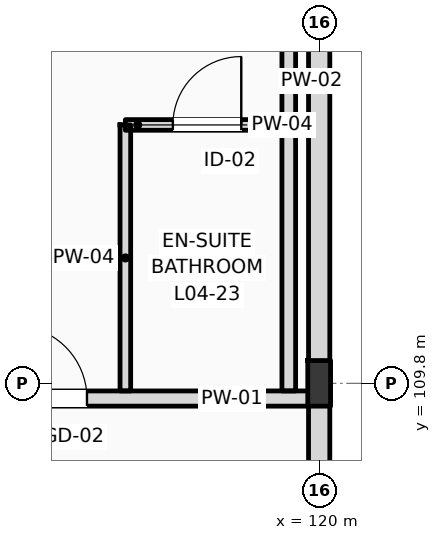
"""IFC4 building model, lengths in metres.
Left out: names, types, materials, properties, quantities, classifications, styles, units other than length and angle.
Written with IfcOpenShell. Run it as: python <this file> out.ifc"""

import sys

from ifc_helpers import new_model, si_unit, direction, frame, frame_2d, origin, origin_2d, place, context, subcontext, project, spatial, rectangle, i_section, extrude, element, fill, save


model = new_model("IFC4")
c1 = context("Model", 3, precision=1e-05, world=origin(), true_north=direction((0.0, 1.0)))
c2 = subcontext(c1, "Body", "Model", "MODEL_VIEW")
j1 = project(units=[si_unit("LENGTHUNIT", "METRE"), si_unit("PLANEANGLEUNIT", "RADIAN")], contexts=[c1])
p1 = place(None, origin())
s1 = spatial("IfcSite", under=j1, at=p1, CompositionType="ELEMENT")
p2 = place(p1, origin())
s2 = spatial("IfcBuilding", under=s1, at=p2, CompositionType="ELEMENT")
p3 = place(p2, frame((0.0, 0.0, 20.4)))
s3 = spatial("IfcBuildingStorey", under=s2, at=p3, CompositionType="ELEMENT", Elevation=20.4)
p4 = place(p3, frame((120.0, 109.8, 0.0), z_axis=(0.0, 0.0, 1.0), x_axis=(1.0, 0.0, 0.0)))
e1 = element("IfcColumn", 1, at=p4, inside=s3, PredefinedType="COLUMN", context=c2, shape_type="SweptSolid", body=[
    extrude(i_section(OverallWidth=0.3, OverallDepth=0.6, WebThickness=0.015, FlangeThickness=0.03, FilletRadius=0.027, at=origin_2d()), origin(), (0.0, 0.0, 1.0), 4.2),
])
p5 = place(p3, frame((120.0, 96.0, 0.0), z_axis=(0.0, 0.0, 1.0), x_axis=(0.0, 1.0, 0.0)))
e2 = element("IfcWall", 2, at=p5, inside=s3, PredefinedType="STANDARD", context=c2, shape_type="SweptSolid", body=[
    extrude(rectangle(XDim=22.0, YDim=0.28, at=frame_2d((11.0, 0.0))), origin(), (0.0, 0.0, 1.0), 3.53),
])
p6 = place(p3, frame((10.65, 109.6, 0.0), z_axis=(0.0, 0.0, 1.0), x_axis=(1.0, 0.0, 0.0)))
e3 = element("IfcWall", 3, at=p6, inside=s3, PredefinedType="PARTITIONING", context=c2, shape_type="SweptSolid", body=[
    extrude(rectangle(XDim=109.21, YDim=0.2, at=frame_2d((54.605, 0.0))), origin(), (0.0, 0.0, 1.0), 3.38),
])
p7 = place(p6, frame((12.535, 0.0, 0.0)))
e4 = element("IfcOpeningElement", 4, at=p7, cuts=e3, PredefinedType="OPENING", context=c2, shape_type="SweptSolid", body=[
    extrude(rectangle(XDim=1.02, YDim=2.2, at=frame_2d((0.51, 1.1))), frame((0.0, 0.11, 0.0), z_axis=(0.0, -1.0, 0.0), x_axis=(1.0, 0.0, 0.0)), (0.0, 0.0, 1.0), 0.22),
])
p8 = place(p6, frame((19.175, 0.0, 0.0)))
e5 = element("IfcOpeningElement", 5, at=p8, cuts=e3, PredefinedType="OPENING", context=c2, shape_type="SweptSolid", body=[
    extrude(rectangle(XDim=1.02, YDim=2.2, at=frame_2d((0.51, 1.1))), frame((0.0, 0.11, 0.0), z_axis=(0.0, -1.0, 0.0), x_axis=(1.0, 0.0, 0.0)), (0.0, 0.0, 1.0), 0.22),
])
p9 = place(p6, frame((23.375, 0.0, 0.0)))
e6 = element("IfcOpeningElement", 6, at=p9, cuts=e3, PredefinedType="OPENING", context=c2, shape_type="SweptSolid", body=[
    extrude(rectangle(XDim=1.02, YDim=2.2, at=frame_2d((0.51, 1.1))), frame((0.0, 0.11, 0.0), z_axis=(0.0, -1.0, 0.0), x_axis=(1.0, 0.0, 0.0)), (0.0, 0.0, 1.0), 0.22),
])
p10 = place(p6, frame((27.575, 0.0, 0.0)))
e7 = element("IfcOpeningElement", 7, at=p10, cuts=e3, PredefinedType="OPENING", context=c2, shape_type="SweptSolid", body=[
    extrude(rectangle(XDim=1.02, YDim=2.2, at=frame_2d((0.51, 1.1))), frame((0.0, 0.11, 0.0), z_axis=(0.0, -1.0, 0.0), x_axis=(1.0, 0.0, 0.0)), (0.0, 0.0, 1.0), 0.22),
])
p11 = place(p6, frame((31.805, 0.0, 0.0)))
e8 = element("IfcOpeningElement", 8, at=p11, cuts=e3, PredefinedType="OPENING", context=c2, shape_type="SweptSolid", body=[
    extrude(rectangle(XDim=0.96, YDim=2.2, at=frame_2d((0.48, 1.1))), frame((0.0, 0.11, 0.0), z_axis=(0.0, -1.0, 0.0), x_axis=(1.0, 0.0, 0.0)), (0.0, 0.0, 1.0), 0.22),
])
p12 = place(p6, frame((33.855, 0.0, 0.0)))
e9 = element("IfcOpeningElement", 9, at=p12, cuts=e3, PredefinedType="OPENING", context=c2, shape_type="SweptSolid", body=[
    extrude(rectangle(XDim=0.96, YDim=2.2, at=frame_2d((0.48, 1.1))), frame((0.0, 0.11, 0.0), z_axis=(0.0, -1.0, 0.0), x_axis=(1.0, 0.0, 0.0)), (0.0, 0.0, 1.0), 0.22),
])
p13 = place(p6, frame((40.205, 0.0, 0.0)))
e10 = element("IfcOpeningElement", 10, at=p13, cuts=e3, PredefinedType="OPENING", context=c2, shape_type="SweptSolid", body=[
    extrude(rectangle(XDim=0.96, YDim=2.2, at=frame_2d((0.48, 1.1))), frame((0.0, 0.11, 0.0), z_axis=(0.0, -1.0, 0.0), x_axis=(1.0, 0.0, 0.0)), (0.0, 0.0, 1.0), 0.22),
])
p14 = place(p6, frame((42.255, 0.0, 0.0)))
e11 = element("IfcOpeningElement", 11, at=p14, cuts=e3, PredefinedType="OPENING", context=c2, shape_type="SweptSolid", body=[
    extrude(rectangle(XDim=0.96, YDim=2.2, at=frame_2d((0.48, 1.1))), frame((0.0, 0.11, 0.0), z_axis=(0.0, -1.0, 0.0), x_axis=(1.0, 0.0, 0.0)), (0.0, 0.0, 1.0), 0.22),
])
p15 = place(p6, frame((48.605, 0.0, 0.0)))
e12 = element("IfcOpeningElement", 12, at=p15, cuts=e3, PredefinedType="OPENING", context=c2, shape_type="SweptSolid", body=[
    extrude(rectangle(XDim=0.96, YDim=2.2, at=frame_2d((0.48, 1.1))), frame((0.0, 0.11, 0.0), z_axis=(0.0, -1.0, 0.0), x_axis=(1.0, 0.0, 0.0)), (0.0, 0.0, 1.0), 0.22),
])
p16 = place(p6, frame((50.655, 0.0, 0.0)))
e13 = element("IfcOpeningElement", 13, at=p16, cuts=e3, PredefinedType="OPENING", context=c2, shape_type="SweptSolid", body=[
    extrude(rectangle(XDim=0.96, YDim=2.2, at=frame_2d((0.48, 1.1))), frame((0.0, 0.11, 0.0), z_axis=(0.0, -1.0, 0.0), x_axis=(1.0, 0.0, 0.0)), (0.0, 0.0, 1.0), 0.22),
])
p17 = place(p6, frame((57.005, 0.0, 0.0)))
e14 = element("IfcOpeningElement", 14, at=p17, cuts=e3, PredefinedType="OPENING", context=c2, shape_type="SweptSolid", body=[
    extrude(rectangle(XDim=0.96, YDim=2.2, at=frame_2d((0.48, 1.1))), frame((0.0, 0.11, 0.0), z_axis=(0.0, -1.0, 0.0), x_axis=(1.0, 0.0, 0.0)), (0.0, 0.0, 1.0), 0.22),
])
p18 = place(p6, frame((59.055, 0.0, 0.0)))
e15 = element("IfcOpeningElement", 15, at=p18, cuts=e3, PredefinedType="OPENING", context=c2, shape_type="SweptSolid", body=[
    extrude(rectangle(XDim=0.96, YDim=2.2, at=frame_2d((0.48, 1.1))), frame((0.0, 0.11, 0.0), z_axis=(0.0, -1.0, 0.0), x_axis=(1.0, 0.0, 0.0)), (0.0, 0.0, 1.0), 0.22),
])
p19 = place(p6, frame((65.405, 0.0, 0.0)))
e16 = element("IfcOpeningElement", 16, at=p19, cuts=e3, PredefinedType="OPENING", context=c2, shape_type="SweptSolid", body=[
    extrude(rectangle(XDim=0.96, YDim=2.2, at=frame_2d((0.48, 1.1))), frame((0.0, 0.11, 0.0), z_axis=(0.0, -1.0, 0.0), x_axis=(1.0, 0.0, 0.0)), (0.0, 0.0, 1.0), 0.22),
])
p20 = place(p6, frame((67.205, 0.0, 0.0)))
e17 = element("IfcOpeningElement", 17, at=p20, cuts=e3, PredefinedType="OPENING", context=c2, shape_type="SweptSolid", body=[
    extrude(rectangle(XDim=0.96, YDim=2.2, at=frame_2d((0.48, 1.1))), frame((0.0, 0.11, 0.0), z_axis=(0.0, -1.0, 0.0), x_axis=(1.0, 0.0, 0.0)), (0.0, 0.0, 1.0), 0.22),
])
p21 = place(p6, frame((73.805, 0.0, 0.0)))
e18 = element("IfcOpeningElement", 18, at=p21, cuts=e3, PredefinedType="OPENING", context=c2, shape_type="SweptSolid", body=[
    extrude(rectangle(XDim=0.96, YDim=2.2, at=frame_2d((0.48, 1.1))), frame((0.0, 0.11, 0.0), z_axis=(0.0, -1.0, 0.0), x_axis=(1.0, 0.0, 0.0)), (0.0, 0.0, 1.0), 0.22),
])
p22 = place(p6, frame((78.255, 0.0, 0.0)))
e19 = element("IfcOpeningElement", 19, at=p22, cuts=e3, PredefinedType="OPENING", context=c2, shape_type="SweptSolid", body=[
    extrude(rectangle(XDim=0.96, YDim=2.2, at=frame_2d((0.48, 1.1))), frame((0.0, 0.11, 0.0), z_axis=(0.0, -1.0, 0.0), x_axis=(1.0, 0.0, 0.0)), (0.0, 0.0, 1.0), 0.22),
])
p23 = place(p6, frame((82.205, 0.0, 0.0)))
e20 = element("IfcOpeningElement", 20, at=p23, cuts=e3, PredefinedType="OPENING", context=c2, shape_type="SweptSolid", body=[
    extrude(rectangle(XDim=0.96, YDim=2.2, at=frame_2d((0.48, 1.1))), frame((0.0, 0.11, 0.0), z_axis=(0.0, -1.0, 0.0), x_axis=(1.0, 0.0, 0.0)), (0.0, 0.0, 1.0), 0.22),
])
p24 = place(p6, frame((86.405, 0.0, 0.0)))
e21 = element("IfcOpeningElement", 21, at=p24, cuts=e3, PredefinedType="OPENING", context=c2, shape_type="SweptSolid", body=[
    extrude(rectangle(XDim=0.96, YDim=2.2, at=frame_2d((0.48, 1.1))), frame((0.0, 0.11, 0.0), z_axis=(0.0, -1.0, 0.0), x_axis=(1.0, 0.0, 0.0)), (0.0, 0.0, 1.0), 0.22),
])
p25 = place(p6, frame((90.605, 0.0, 0.0)))
e22 = element("IfcOpeningElement", 22, at=p25, cuts=e3, PredefinedType="OPENING", context=c2, shape_type="SweptSolid", body=[
    extrude(rectangle(XDim=0.96, YDim=2.2, at=frame_2d((0.48, 1.1))), frame((0.0, 0.11, 0.0), z_axis=(0.0, -1.0, 0.0), x_axis=(1.0, 0.0, 0.0)), (0.0, 0.0, 1.0), 0.22),
])
p26 = place(p6, frame((94.805, 0.0, 0.0)))
e23 = element("IfcOpeningElement", 23, at=p26, cuts=e3, PredefinedType="OPENING", context=c2, shape_type="SweptSolid", body=[
    extrude(rectangle(XDim=0.96, YDim=2.2, at=frame_2d((0.48, 1.1))), frame((0.0, 0.11, 0.0), z_axis=(0.0, -1.0, 0.0), x_axis=(1.0, 0.0, 0.0)), (0.0, 0.0, 1.0), 0.22),
])
p27 = place(p6, frame((99.005, 0.0, 0.0)))
e24 = element("IfcOpeningElement", 24, at=p27, cuts=e3, PredefinedType="OPENING", context=c2, shape_type="SweptSolid", body=[
    extrude(rectangle(XDim=0.96, YDim=2.2, at=frame_2d((0.48, 1.1))), frame((0.0, 0.11, 0.0), z_axis=(0.0, -1.0, 0.0), x_axis=(1.0, 0.0, 0.0)), (0.0, 0.0, 1.0), 0.22),
])
p28 = place(p6, frame((103.205, 0.0, 0.0)))
e25 = element("IfcOpeningElement", 25, at=p28, cuts=e3, PredefinedType="OPENING", context=c2, shape_type="SweptSolid", body=[
    extrude(rectangle(XDim=0.96, YDim=2.2, at=frame_2d((0.48, 1.1))), frame((0.0, 0.11, 0.0), z_axis=(0.0, -1.0, 0.0), x_axis=(1.0, 0.0, 0.0)), (0.0, 0.0, 1.0), 0.22),
])
p29 = place(p6, frame((105.335, 0.0, 0.0)))
e26 = element("IfcOpeningElement", 26, at=p29, cuts=e3, PredefinedType="OPENING", context=c2, shape_type="SweptSolid", body=[
    extrude(rectangle(XDim=0.96, YDim=2.2, at=frame_2d((0.48, 1.1))), frame((0.0, 0.11, 0.0), z_axis=(0.0, -1.0, 0.0), x_axis=(1.0, 0.0, 0.0)), (0.0, 0.0, 1.0), 0.22),
])
p30 = place(p6, frame((2.716, 0.0, 0.0)))
e27 = element("IfcOpeningElement", 27, at=p30, cuts=e3, PredefinedType="OPENING", context=c2, shape_type="SweptSolid", body=[
    extrude(rectangle(XDim=1.35, YDim=2.25, at=frame_2d((0.675, 1.125))), frame((0.0, 0.11, 0.0), z_axis=(0.0, -1.0, 0.0), x_axis=(1.0, 0.0, 0.0)), (0.0, 0.0, 1.0), 0.22),
])
p31 = place(p6, frame((6.65, 0.0, 0.0)))
e28 = element("IfcOpeningElement", 28, at=p31, cuts=e3, PredefinedType="OPENING", context=c2, shape_type="SweptSolid", body=[
    extrude(rectangle(XDim=1.35, YDim=2.25, at=frame_2d((0.675, 1.125))), frame((0.0, 0.11, 0.0), z_axis=(0.0, -1.0, 0.0), x_axis=(1.0, 0.0, 0.0)), (0.0, 0.0, 1.0), 0.22),
])
p32 = place(p6, frame((10.583, 0.0, 0.0)))
e29 = element("IfcOpeningElement", 29, at=p32, cuts=e3, PredefinedType="OPENING", context=c2, shape_type="SweptSolid", body=[
    extrude(rectangle(XDim=1.35, YDim=2.25, at=frame_2d((0.675, 1.125))), frame((0.0, 0.11, 0.0), z_axis=(0.0, -1.0, 0.0), x_axis=(1.0, 0.0, 0.0)), (0.0, 0.0, 1.0), 0.22),
])
p33 = place(p3, frame((119.6, 109.7, 0.0), z_axis=(0.0, 0.0, 1.0), x_axis=(0.0, 1.0, 0.0)))
e30 = element("IfcWall", 30, at=p33, inside=s3, PredefinedType="PARTITIONING", context=c2, shape_type="SweptSolid", body=[
    extrude(rectangle(XDim=8.15, YDim=0.18, at=frame_2d((4.075, 0.0))), origin(), (0.0, 0.0, 1.0), 3.94),
])
p34 = place(p3, frame((117.45, 109.7, 0.0), z_axis=(0.0, 0.0, 1.0), x_axis=(0.0, 1.0, 0.0)))
e31 = element("IfcWall", 31, at=p34, inside=s3, PredefinedType="PARTITIONING", context=c2, shape_type="SweptSolid", body=[
    extrude(rectangle(XDim=3.5, YDim=0.14, at=frame_2d((1.75, 0.0))), origin(), (0.0, 0.0, 1.0), 3.94),
])
p35 = place(p3, frame((117.45, 113.2, 0.0), z_axis=(0.0, 0.0, 1.0), x_axis=(1.0, 0.0, 0.0)))
e32 = element("IfcWall", 32, at=p35, inside=s3, PredefinedType="PARTITIONING", context=c2, shape_type="SweptSolid", body=[
    extrude(rectangle(XDim=2.15, YDim=0.14, at=frame_2d((1.075, 0.0))), origin(), (0.0, 0.0, 1.0), 3.94),
])
p36 = place(p35, frame((0.625, 0.0, 0.0)))
e33 = element("IfcOpeningElement", 33, at=p36, cuts=e32, PredefinedType="OPENING", context=c2, shape_type="SweptSolid", body=[
    extrude(rectangle(XDim=0.9, YDim=2.1, at=frame_2d((0.45, 1.05))), frame((0.0, 0.08, 0.0), z_axis=(0.0, -1.0, 0.0), x_axis=(1.0, 0.0, 0.0)), (0.0, 0.0, 1.0), 0.16),
])
p37 = place(p29, origin())
e34 = element("IfcDoor", 34, at=p37, inside=s3, OperationType="SINGLE_SWING_LEFT", PredefinedType="DOOR", context=c2, shape_type="SweptSolid", body=[
    extrude(rectangle(XDim=0.96, YDim=2.2, at=frame_2d((0.48, 1.1))), frame((0.0, 0.025, 0.0), z_axis=(0.0, -1.0, 0.0), x_axis=(1.0, 0.0, 0.0)), (0.0, 0.0, 1.0), 0.05),
])
fill(e26, e34)
p38 = place(p36, origin())
e35 = element("IfcDoor", 35, at=p38, inside=s3, OperationType="SINGLE_SWING_RIGHT", PredefinedType="DOOR", context=c2, shape_type="SweptSolid", body=[
    extrude(rectangle(XDim=0.9, YDim=2.1, at=frame_2d((0.45, 1.05))), frame((0.0, 0.025, 0.0), z_axis=(0.0, -1.0, 0.0), x_axis=(1.0, 0.0, 0.0)), (0.0, 0.0, 1.0), 0.05),
])
fill(e33, e35)
save(model, sys.argv[1])
